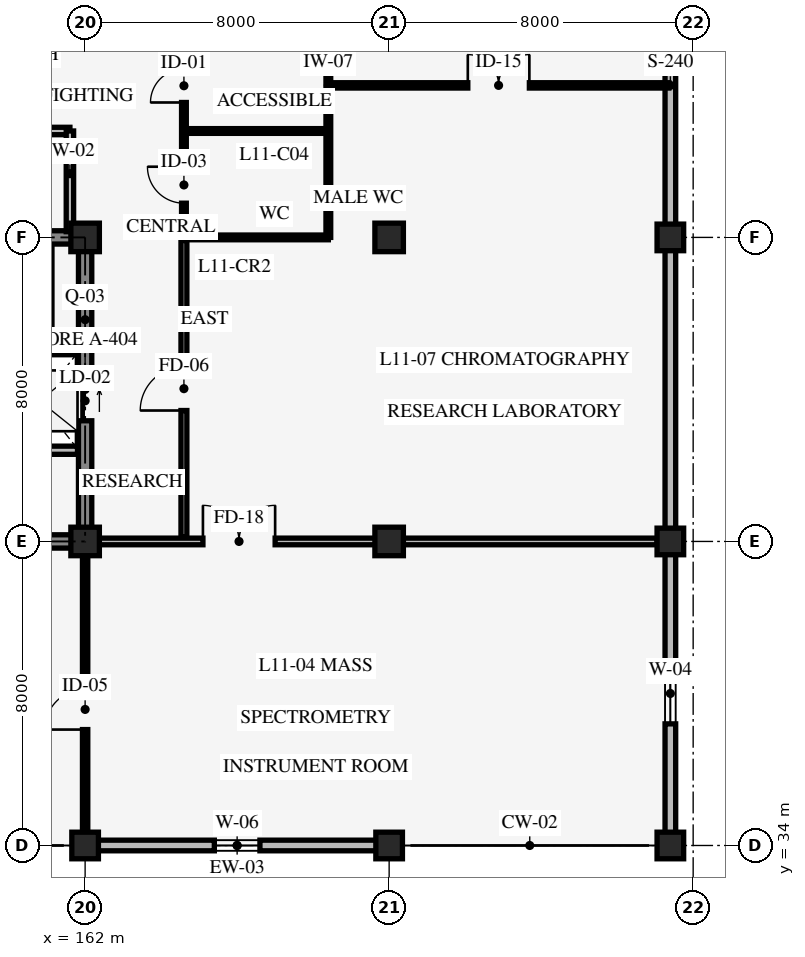
"""IFC4 building model, lengths in metres.
Left out: names, types, materials, properties, quantities, classifications, styles, units other than length and angle.
Written with IfcOpenShell. Run it as: python <this file> out.ifc"""

import sys

from ifc_helpers import new_model, si_unit, direction, frame, frame_2d, origin, origin_2d, place, context, subcontext, project, spatial, rectangle, extrude, element, fill, save


model = new_model("IFC4")
c1 = context("Model", 3, precision=1e-05, world=origin(), true_north=direction((0.0, 1.0)))
c2 = subcontext(c1, "Body", "Model", "MODEL_VIEW")
j1 = project(units=[si_unit("LENGTHUNIT", "METRE"), si_unit("PLANEANGLEUNIT", "RADIAN")], contexts=[c1])
p1 = place(None, origin())
s1 = spatial("IfcSite", under=j1, at=p1, CompositionType="ELEMENT")
p2 = place(p1, origin())
s2 = spatial("IfcBuilding", under=s1, at=p2, CompositionType="ELEMENT")
p3 = place(p2, frame((0.0, 0.0, 44.4)))
s3 = spatial("IfcBuildingStorey", under=s2, at=p3, CompositionType="ELEMENT", Elevation=44.4)
p4 = place(p3, frame((154.0, 42.0, 0.0), z_axis=(0.0, 0.0, 1.0), x_axis=(1.0, 0.0, 0.0)))
e1 = element("IfcWall", 1, at=p4, inside=s3, PredefinedType="SHEAR", context=c2, shape_type="SweptSolid", body=[
    extrude(rectangle(XDim=8.0, YDim=0.35, at=frame_2d((4.0, 0.0))), origin(), (0.0, 0.0, 1.0), 3.95),
])
p5 = place(p3, frame((162.0, 42.0, 0.0), z_axis=(0.0, 0.0, 1.0), x_axis=(0.0, 1.0, 0.0)))
e2 = element("IfcWall", 2, at=p5, inside=s3, PredefinedType="SHEAR", context=c2, shape_type="SweptSolid", body=[
    extrude(rectangle(XDim=8.0, YDim=0.35, at=frame_2d((4.0, 0.0))), origin(), (0.0, 0.0, 1.0), 3.95),
])
p6 = place(p5, frame((3.175, 0.0, 0.0)))
e3 = element("IfcOpeningElement", 3, at=p6, cuts=e2, PredefinedType="OPENING", context=c2, shape_type="SweptSolid", body=[
    extrude(rectangle(XDim=1.05, YDim=2.2, at=frame_2d((0.525, 1.1))), frame((0.0, 0.185, 0.0), z_axis=(0.0, -1.0, 0.0), x_axis=(1.0, 0.0, 0.0)), (0.0, 0.0, 1.0), 0.37),
])
p7 = place(p3, frame((162.0, 50.0, 0.0), z_axis=(0.0, 0.0, 1.0), x_axis=(-1.0, 0.0, 0.0)))
e4 = element("IfcWall", 4, at=p7, inside=s3, PredefinedType="SHEAR", context=c2, shape_type="SweptSolid", body=[
    extrude(rectangle(XDim=8.0, YDim=0.35, at=frame_2d((4.0, 0.0))), origin(), (0.0, 0.0, 1.0), 3.95),
])
p8 = place(p7, frame((5.3, 0.0, 0.0)))
e5 = element("IfcOpeningElement", 5, at=p8, cuts=e4, PredefinedType="OPENING", context=c2, shape_type="SweptSolid", body=[
    extrude(rectangle(XDim=1.3, YDim=2.15, at=frame_2d((0.65, 1.075))), frame((0.0, 0.185, 0.0), z_axis=(0.0, -1.0, 0.0), x_axis=(1.0, 0.0, 0.0)), (0.0, 0.0, 1.0), 0.37),
])
p9 = place(p7, frame((1.45, 0.0, 0.0)))
e6 = element("IfcOpeningElement", 6, at=p9, cuts=e4, PredefinedType="OPENING", context=c2, shape_type="SweptSolid", body=[
    extrude(rectangle(XDim=1.1, YDim=2.2, at=frame_2d((0.55, 1.1))), frame((0.0, 0.185, 0.0), z_axis=(0.0, -1.0, 0.0), x_axis=(1.0, 0.0, 0.0)), (0.0, 0.0, 1.0), 0.37),
])
p10 = place(p3, frame((162.0, 34.0, 0.0), z_axis=(0.0, 0.0, 1.0), x_axis=(1.0, 0.0, 0.0)))
e7 = element("IfcColumn", 7, at=p10, inside=s3, PredefinedType="COLUMN", context=c2, shape_type="SweptSolid", body=[
    extrude(rectangle(XDim=0.7, YDim=0.7, at=origin_2d()), origin(), (0.0, 0.0, 1.0), 4.2),
])
for number, where, z_axis, x_axis in (
    (8, (162.0, 42.0, 0.0), (0.0, 0.0, 1.0), (1.0, 0.0, 0.0)),
    (9, (162.0, 50.0, 0.0), (0.0, 0.0, 1.0), (1.0, 0.0, 0.0)),
):
    element("IfcColumn", number, at=place(p3, frame(where, z_axis=z_axis, x_axis=x_axis)), inside=s3, PredefinedType="COLUMN", context=c2, shape_type="SweptSolid", body=[
        extrude(rectangle(XDim=0.75, YDim=0.75, at=origin_2d()), origin(), (0.0, 0.0, 1.0), 4.2),
    ])
p11 = place(p3, frame((170.0, 34.0, 0.0), z_axis=(0.0, 0.0, 1.0), x_axis=(1.0, 0.0, 0.0)))
e10 = element("IfcColumn", 10, at=p11, inside=s3, PredefinedType="COLUMN", context=c2, shape_type="SweptSolid", body=[
    extrude(rectangle(XDim=0.7, YDim=0.7, at=origin_2d()), origin(), (0.0, 0.0, 1.0), 4.2),
])
for number, where, z_axis, x_axis in (
    (11, (170.0, 42.0, 0.0), (0.0, 0.0, 1.0), (1.0, 0.0, 0.0)),
    (12, (170.0, 50.0, 0.0), (0.0, 0.0, 1.0), (1.0, 0.0, 0.0)),
):
    element("IfcColumn", number, at=place(p3, frame(where, z_axis=z_axis, x_axis=x_axis)), inside=s3, PredefinedType="COLUMN", context=c2, shape_type="SweptSolid", body=[
        extrude(rectangle(XDim=0.75, YDim=0.75, at=origin_2d()), origin(), (0.0, 0.0, 1.0), 4.2),
    ])
for number, where, z_axis, x_axis in (
    (13, (177.4, 34.0, 0.0), (0.0, 0.0, 1.0), (1.0, 0.0, 0.0)),
    (14, (177.4, 42.0, 0.0), (0.0, 0.0, 1.0), (1.0, 0.0, 0.0)),
    (15, (177.4, 50.0, 0.0), (0.0, 0.0, 1.0), (1.0, 0.0, 0.0)),
):
    element("IfcColumn", number, at=place(p3, frame(where, z_axis=z_axis, x_axis=x_axis)), inside=s3, PredefinedType="COLUMN", context=c2, shape_type="SweptSolid", body=[
        extrude(rectangle(XDim=0.7, YDim=0.7, at=origin_2d()), origin(), (0.0, 0.0, 1.0), 4.2),
    ])
p12 = place(p3, frame((170.0, 34.0, 0.0), z_axis=(0.0, 0.0, 1.0), x_axis=(-1.0, 0.0, 0.0)))
e16 = element("IfcWall", 16, at=p12, inside=s3, PredefinedType="STANDARD", context=c2, shape_type="SweptSolid", body=[
    extrude(rectangle(XDim=8.0, YDim=0.28, at=frame_2d((4.0, 0.0))), origin(), (0.0, 0.0, 1.0), 3.19),
])
p13 = place(p12, frame((3.4, 0.0, 0.85)))
e17 = element("IfcOpeningElement", 17, at=p13, cuts=e16, PredefinedType="OPENING", context=c2, shape_type="SweptSolid", body=[
    extrude(rectangle(XDim=1.2, YDim=1.2, at=frame_2d((0.6, 0.6))), frame((0.0, 0.15, 0.0), z_axis=(0.0, -1.0, 0.0), x_axis=(1.0, 0.0, 0.0)), (0.0, 0.0, 1.0), 0.3),
])
p14 = place(p3, frame((177.4, 58.0, 0.0), z_axis=(0.0, 0.0, 1.0), x_axis=(0.0, -1.0, 0.0)))
e18 = element("IfcWall", 18, at=p14, inside=s3, PredefinedType="STANDARD", context=c2, shape_type="SweptSolid", body=[
    extrude(rectangle(XDim=8.0, YDim=0.28, at=frame_2d((4.0, 0.0))), origin(), (0.0, 0.0, 1.0), 3.24),
])
p15 = place(p14, frame((1.467, 0.0, 0.85)))
e19 = element("IfcOpeningElement", 19, at=p15, cuts=e18, PredefinedType="OPENING", context=c2, shape_type="SweptSolid", body=[
    extrude(rectangle(XDim=1.8, YDim=1.4, at=frame_2d((0.9, 0.7))), frame((0.0, 0.15, 0.0), z_axis=(0.0, -1.0, 0.0), x_axis=(1.0, 0.0, 0.0)), (0.0, 0.0, 1.0), 0.3),
])
p16 = place(p3, frame((177.4, 50.0, 0.0), z_axis=(0.0, 0.0, 1.0), x_axis=(0.0, -1.0, 0.0)))
e20 = element("IfcWall", 20, at=p16, inside=s3, PredefinedType="STANDARD", context=c2, shape_type="SweptSolid", body=[
    extrude(rectangle(XDim=8.0, YDim=0.28, at=frame_2d((4.0, 0.0))), origin(), (0.0, 0.0, 1.0), 3.24),
])
p17 = place(p3, frame((177.4, 42.0, 0.0), z_axis=(0.0, 0.0, 1.0), x_axis=(0.0, -1.0, 0.0)))
e21 = element("IfcWall", 21, at=p17, inside=s3, PredefinedType="STANDARD", context=c2, shape_type="SweptSolid", body=[
    extrude(rectangle(XDim=8.0, YDim=0.28, at=frame_2d((4.0, 0.0))), origin(), (0.0, 0.0, 1.0), 3.24),
])
p18 = place(p17, frame((3.2, 0.0, 0.85)))
e22 = element("IfcOpeningElement", 22, at=p18, cuts=e21, PredefinedType="OPENING", context=c2, shape_type="SweptSolid", body=[
    extrude(rectangle(XDim=1.6, YDim=1.2, at=frame_2d((0.8, 0.6))), frame((0.0, 0.15, 0.0), z_axis=(0.0, -1.0, 0.0), x_axis=(1.0, 0.0, 0.0)), (0.0, 0.0, 1.0), 0.3),
])
p19 = place(p3, frame((158.45, 47.02, 0.0), z_axis=(0.0, 0.0, 1.0), x_axis=(1.0, 0.0, 0.0)))
e23 = element("IfcWall", 23, at=p19, inside=s3, PredefinedType="STANDARD", context=c2, shape_type="SweptSolid", body=[
    extrude(rectangle(XDim=3.35, YDim=0.215, at=frame_2d((1.675, 0.0))), origin(), (0.0, 0.0, 1.0), 3.9),
])
p20 = place(p3, frame((159.78, 44.4, 0.0), z_axis=(0.0, 0.0, 1.0), x_axis=(1.0, 0.0, 0.0)))
e24 = element("IfcWall", 24, at=p20, inside=s3, PredefinedType="STANDARD", context=c2, shape_type="SweptSolid", body=[
    extrude(rectangle(XDim=2.02, YDim=0.215, at=frame_2d((1.01, 0.0))), origin(), (0.0, 0.0, 1.0), 3.9),
])
p21 = place(p3, frame((154.0, 52.8, 0.0), z_axis=(0.0, 0.0, 1.0), x_axis=(1.0, 0.0, 0.0)))
e25 = element("IfcWall", 25, at=p21, inside=s3, PredefinedType="STANDARD", context=c2, shape_type="SweptSolid", body=[
    extrude(rectangle(XDim=7.6, YDim=0.195, at=frame_2d((3.8, 0.0))), origin(), (0.0, 0.0, 1.0), 3.9),
])
p22 = place(p21, frame((2.8, 0.0, 0.0)))
e26 = element("IfcOpeningElement", 26, at=p22, cuts=e25, PredefinedType="OPENING", context=c2, shape_type="SweptSolid", body=[
    extrude(rectangle(XDim=1.45, YDim=2.2, at=frame_2d((0.725, 1.1))), frame((0.0, 0.107, 0.0), z_axis=(0.0, -1.0, 0.0), x_axis=(1.0, 0.0, 0.0)), (0.0, 0.0, 1.0), 0.215),
])
p23 = place(p3, frame((161.6, 50.15, 0.0), z_axis=(0.0, 0.0, 1.0), x_axis=(0.0, 1.0, 0.0)))
e27 = element("IfcWall", 27, at=p23, inside=s3, PredefinedType="STANDARD", context=c2, shape_type="SweptSolid", body=[
    extrude(rectangle(XDim=2.65, YDim=0.195, at=frame_2d((1.325, 0.0))), origin(), (0.0, 0.0, 1.0), 3.24),
])
p24 = place(p3, frame((164.6, 50.0, 0.0), z_axis=(0.0, 0.0, 1.0), x_axis=(0.0, 1.0, 0.0)))
e28 = element("IfcWall", 28, at=p24, inside=s3, PredefinedType="STANDARD", context=c2, shape_type="SweptSolid", body=[
    extrude(rectangle(XDim=8.0, YDim=0.125, at=frame_2d((4.0, 0.0))), origin(), (0.0, 0.0, 1.0), 3.9),
])
p25 = place(p24, frame((0.9, 0.0, 0.0)))
e29 = element("IfcOpeningElement", 29, at=p25, cuts=e28, PredefinedType="OPENING", context=c2, shape_type="SweptSolid", body=[
    extrude(rectangle(XDim=0.96, YDim=2.08, at=frame_2d((0.48, 1.04))), frame((0.0, 0.073, 0.0), z_axis=(0.0, -1.0, 0.0), x_axis=(1.0, 0.0, 0.0)), (0.0, 0.0, 1.0), 0.145),
])
p26 = place(p24, frame((3.55, 0.0, 0.0)))
e30 = element("IfcOpeningElement", 30, at=p26, cuts=e28, PredefinedType="OPENING", context=c2, shape_type="SweptSolid", body=[
    extrude(rectangle(XDim=0.88, YDim=2.05, at=frame_2d((0.44, 1.025))), frame((0.0, 0.073, 0.0), z_axis=(0.0, -1.0, 0.0), x_axis=(1.0, 0.0, 0.0)), (0.0, 0.0, 1.0), 0.145),
])
p27 = place(p24, frame((6.15, 0.0, 0.0)))
e31 = element("IfcOpeningElement", 31, at=p27, cuts=e28, PredefinedType="OPENING", context=c2, shape_type="SweptSolid", body=[
    extrude(rectangle(XDim=0.92, YDim=2.05, at=frame_2d((0.46, 1.025))), frame((0.0, 0.073, 0.0), z_axis=(0.0, -1.0, 0.0), x_axis=(1.0, 0.0, 0.0)), (0.0, 0.0, 1.0), 0.145),
])
p28 = place(p3, frame((168.4, 50.0, 0.0), z_axis=(0.0, 0.0, 1.0), x_axis=(0.0, 1.0, 0.0)))
e32 = element("IfcWall", 32, at=p28, inside=s3, PredefinedType="STANDARD", context=c2, shape_type="SweptSolid", body=[
    extrude(rectangle(XDim=8.0, YDim=0.125, at=frame_2d((4.0, 0.0))), origin(), (0.0, 0.0, 1.0), 3.9),
])
p29 = place(p3, frame((164.6, 50.0, 0.0), z_axis=(0.0, 0.0, 1.0), x_axis=(1.0, 0.0, 0.0)))
e33 = element("IfcWall", 33, at=p29, inside=s3, PredefinedType="STANDARD", context=c2, shape_type="SweptSolid", body=[
    extrude(rectangle(XDim=3.8, YDim=0.125, at=frame_2d((1.9, 0.0))), origin(), (0.0, 0.0, 1.0), 3.19),
])
p30 = place(p3, frame((164.6, 52.8, 0.0), z_axis=(0.0, 0.0, 1.0), x_axis=(1.0, 0.0, 0.0)))
e34 = element("IfcWall", 34, at=p30, inside=s3, PredefinedType="STANDARD", context=c2, shape_type="SweptSolid", body=[
    extrude(rectangle(XDim=3.8, YDim=0.125, at=frame_2d((1.9, 0.0))), origin(), (0.0, 0.0, 1.0), 3.9),
])
p31 = place(p3, frame((164.6, 42.12, 0.0), z_axis=(0.0, 0.0, 1.0), x_axis=(0.0, 1.0, 0.0)))
e35 = element("IfcWall", 35, at=p31, inside=s3, PredefinedType="STANDARD", context=c2, shape_type="SweptSolid", body=[
    extrude(rectangle(XDim=7.8, YDim=0.155, at=frame_2d((3.9, 0.0))), origin(), (0.0, 0.0, 1.0), 3.9),
])
p32 = place(p31, frame((3.325, 0.0, 0.0)))
e36 = element("IfcOpeningElement", 36, at=p32, cuts=e35, PredefinedType="OPENING", context=c2, shape_type="SweptSolid", body=[
    extrude(rectangle(XDim=1.15, YDim=2.1, at=frame_2d((0.575, 1.05))), frame((0.0, 0.087, 0.0), z_axis=(0.0, -1.0, 0.0), x_axis=(1.0, 0.0, 0.0)), (0.0, 0.0, 1.0), 0.175),
])
p33 = place(p3, frame((168.4, 54.0, 0.0), z_axis=(0.0, 0.0, 1.0), x_axis=(1.0, 0.0, 0.0)))
e37 = element("IfcWall", 37, at=p33, inside=s3, PredefinedType="STANDARD", context=c2, shape_type="SweptSolid", body=[
    extrude(rectangle(XDim=8.96, YDim=0.14, at=frame_2d((4.48, 0.0))), origin(), (0.0, 0.0, 1.0), 3.9),
])
p34 = place(p33, frame((3.67, 0.0, 0.0)))
e38 = element("IfcOpeningElement", 38, at=p34, cuts=e37, PredefinedType="OPENING", context=c2, shape_type="SweptSolid", body=[
    extrude(rectangle(XDim=1.62, YDim=2.22, at=frame_2d((0.81, 1.11))), frame((0.0, 0.08, 0.0), z_axis=(0.0, -1.0, 0.0), x_axis=(1.0, 0.0, 0.0)), (0.0, 0.0, 1.0), 0.16),
])
p35 = place(p3, frame((162.0, 34.05, 0.0), z_axis=(0.0, 0.0, 1.0), x_axis=(0.0, 1.0, 0.0)))
e39 = element("IfcWall", 39, at=p35, inside=s3, PredefinedType="STANDARD", context=c2, shape_type="SweptSolid", body=[
    extrude(rectangle(XDim=7.83, YDim=0.14, at=frame_2d((3.915, 0.0))), origin(), (0.0, 0.0, 1.0), 3.24),
])
p36 = place(p35, frame((3.0, 0.0, 0.0)))
e40 = element("IfcOpeningElement", 40, at=p36, cuts=e39, PredefinedType="OPENING", context=c2, shape_type="SweptSolid", body=[
    extrude(rectangle(XDim=1.06, YDim=2.12, at=frame_2d((0.53, 1.06))), frame((0.0, 0.08, 0.0), z_axis=(0.0, -1.0, 0.0), x_axis=(1.0, 0.0, 0.0)), (0.0, 0.0, 1.0), 0.16),
])
p37 = place(p3, frame((162.35, 42.0, 0.0), z_axis=(0.0, 0.0, 1.0), x_axis=(1.0, 0.0, 0.0)))
e41 = element("IfcWall", 41, at=p37, inside=s3, PredefinedType="STANDARD", context=c2, shape_type="SweptSolid", body=[
    extrude(rectangle(XDim=14.7, YDim=0.175, at=frame_2d((7.35, 0.0))), origin(), (0.0, 0.0, 1.0), 3.19),
])
p38 = place(p37, frame((2.75, 0.0, 0.0)))
e42 = element("IfcOpeningElement", 42, at=p38, cuts=e41, PredefinedType="OPENING", context=c2, shape_type="SweptSolid", body=[
    extrude(rectangle(XDim=1.9, YDim=2.35, at=frame_2d((0.95, 1.175))), frame((0.0, 0.098, 0.0), z_axis=(0.0, -1.0, 0.0), x_axis=(1.0, 0.0, 0.0)), (0.0, 0.0, 1.0), 0.195),
])
p39 = place(p13, origin())
e43 = element("IfcWindow", 43, at=p39, inside=s3, PartitioningType="SINGLE_PANEL", PredefinedType="WINDOW", context=c2, shape_type="SweptSolid", body=[
    extrude(rectangle(XDim=1.2, YDim=1.2, at=frame_2d((0.6, 0.6))), frame((0.0, 0.03, 0.0), z_axis=(0.0, -1.0, 0.0), x_axis=(1.0, 0.0, 0.0)), (0.0, 0.0, 1.0), 0.06),
])
fill(e17, e43)
p40 = place(p15, origin())
e44 = element("IfcWindow", 44, at=p40, inside=s3, PartitioningType="SINGLE_PANEL", PredefinedType="WINDOW", context=c2, shape_type="SweptSolid", body=[
    extrude(rectangle(XDim=1.8, YDim=1.4, at=frame_2d((0.9, 0.7))), frame((0.0, 0.03, 0.0), z_axis=(0.0, -1.0, 0.0), x_axis=(1.0, 0.0, 0.0)), (0.0, 0.0, 1.0), 0.06),
])
fill(e19, e44)
p41 = place(p18, origin())
e45 = element("IfcWindow", 45, at=p41, inside=s3, PartitioningType="SINGLE_PANEL", PredefinedType="WINDOW", context=c2, shape_type="SweptSolid", body=[
    extrude(rectangle(XDim=1.6, YDim=1.2, at=frame_2d((0.8, 0.6))), frame((0.0, 0.03, 0.0), z_axis=(0.0, -1.0, 0.0), x_axis=(1.0, 0.0, 0.0)), (0.0, 0.0, 1.0), 0.06),
])
fill(e22, e45)
p42 = place(p6, origin())
e46 = element("IfcDoor", 46, at=p42, inside=s3, OperationType="SLIDING_TO_LEFT", PredefinedType="DOOR", context=c2, shape_type="SweptSolid", body=[
    extrude(rectangle(XDim=1.05, YDim=2.2, at=frame_2d((0.525, 1.1))), frame((0.0, 0.025, 0.0), z_axis=(0.0, -1.0, 0.0), x_axis=(1.0, 0.0, 0.0)), (0.0, 0.0, 1.0), 0.05),
])
fill(e3, e46)
p43 = place(p25, origin())
e47 = element("IfcDoor", 47, at=p43, inside=s3, OperationType="SINGLE_SWING_RIGHT", PredefinedType="DOOR", context=c2, shape_type="SweptSolid", body=[
    extrude(rectangle(XDim=0.96, YDim=2.08, at=frame_2d((0.48, 1.04))), frame((0.0, 0.025, 0.0), z_axis=(0.0, -1.0, 0.0), x_axis=(1.0, 0.0, 0.0)), (0.0, 0.0, 1.0), 0.05),
])
fill(e29, e47)
p44 = place(p26, origin())
e48 = element("IfcDoor", 48, at=p44, inside=s3, OperationType="SINGLE_SWING_LEFT", PredefinedType="DOOR", context=c2, shape_type="SweptSolid", body=[
    extrude(rectangle(XDim=0.88, YDim=2.05, at=frame_2d((0.44, 1.025))), frame((0.0, 0.025, 0.0), z_axis=(0.0, -1.0, 0.0), x_axis=(1.0, 0.0, 0.0)), (0.0, 0.0, 1.0), 0.05),
])
fill(e30, e48)
p45 = place(p32, origin())
e49 = element("IfcDoor", 49, at=p45, inside=s3, OperationType="SINGLE_SWING_LEFT", PredefinedType="DOOR", context=c2, shape_type="SweptSolid", body=[
    extrude(rectangle(XDim=1.15, YDim=2.1, at=frame_2d((0.575, 1.05))), frame((0.0, 0.025, 0.0), z_axis=(0.0, -1.0, 0.0), x_axis=(1.0, 0.0, 0.0)), (0.0, 0.0, 1.0), 0.05),
])
fill(e36, e49)
p46 = place(p34, origin())
e50 = element("IfcDoor", 50, at=p46, inside=s3, OperationType="DOUBLE_DOOR_SINGLE_SWING", PredefinedType="DOOR", context=c2, shape_type="SweptSolid", body=[
    extrude(rectangle(XDim=1.62, YDim=2.22, at=frame_2d((0.81, 1.11))), frame((0.0, 0.025, 0.0), z_axis=(0.0, -1.0, 0.0), x_axis=(1.0, 0.0, 0.0)), (0.0, 0.0, 1.0), 0.05),
])
fill(e38, e50)
p47 = place(p36, origin())
e51 = element("IfcDoor", 51, at=p47, inside=s3, OperationType="SINGLE_SWING_LEFT", PredefinedType="DOOR", context=c2, shape_type="SweptSolid", body=[
    extrude(rectangle(XDim=1.06, YDim=2.12, at=frame_2d((0.53, 1.06))), frame((0.0, 0.025, 0.0), z_axis=(0.0, -1.0, 0.0), x_axis=(1.0, 0.0, 0.0)), (0.0, 0.0, 1.0), 0.05),
])
fill(e40, e51)
p48 = place(p38, origin())
e52 = element("IfcDoor", 52, at=p48, inside=s3, OperationType="DOUBLE_DOOR_SINGLE_SWING", PredefinedType="DOOR", context=c2, shape_type="SweptSolid", body=[
    extrude(rectangle(XDim=1.9, YDim=2.35, at=frame_2d((0.95, 1.175))), frame((0.0, 0.025, 0.0), z_axis=(0.0, -1.0, 0.0), x_axis=(1.0, 0.0, 0.0)), (0.0, 0.0, 1.0), 0.05),
])
fill(e42, e52)
save(model, sys.argv[1])
